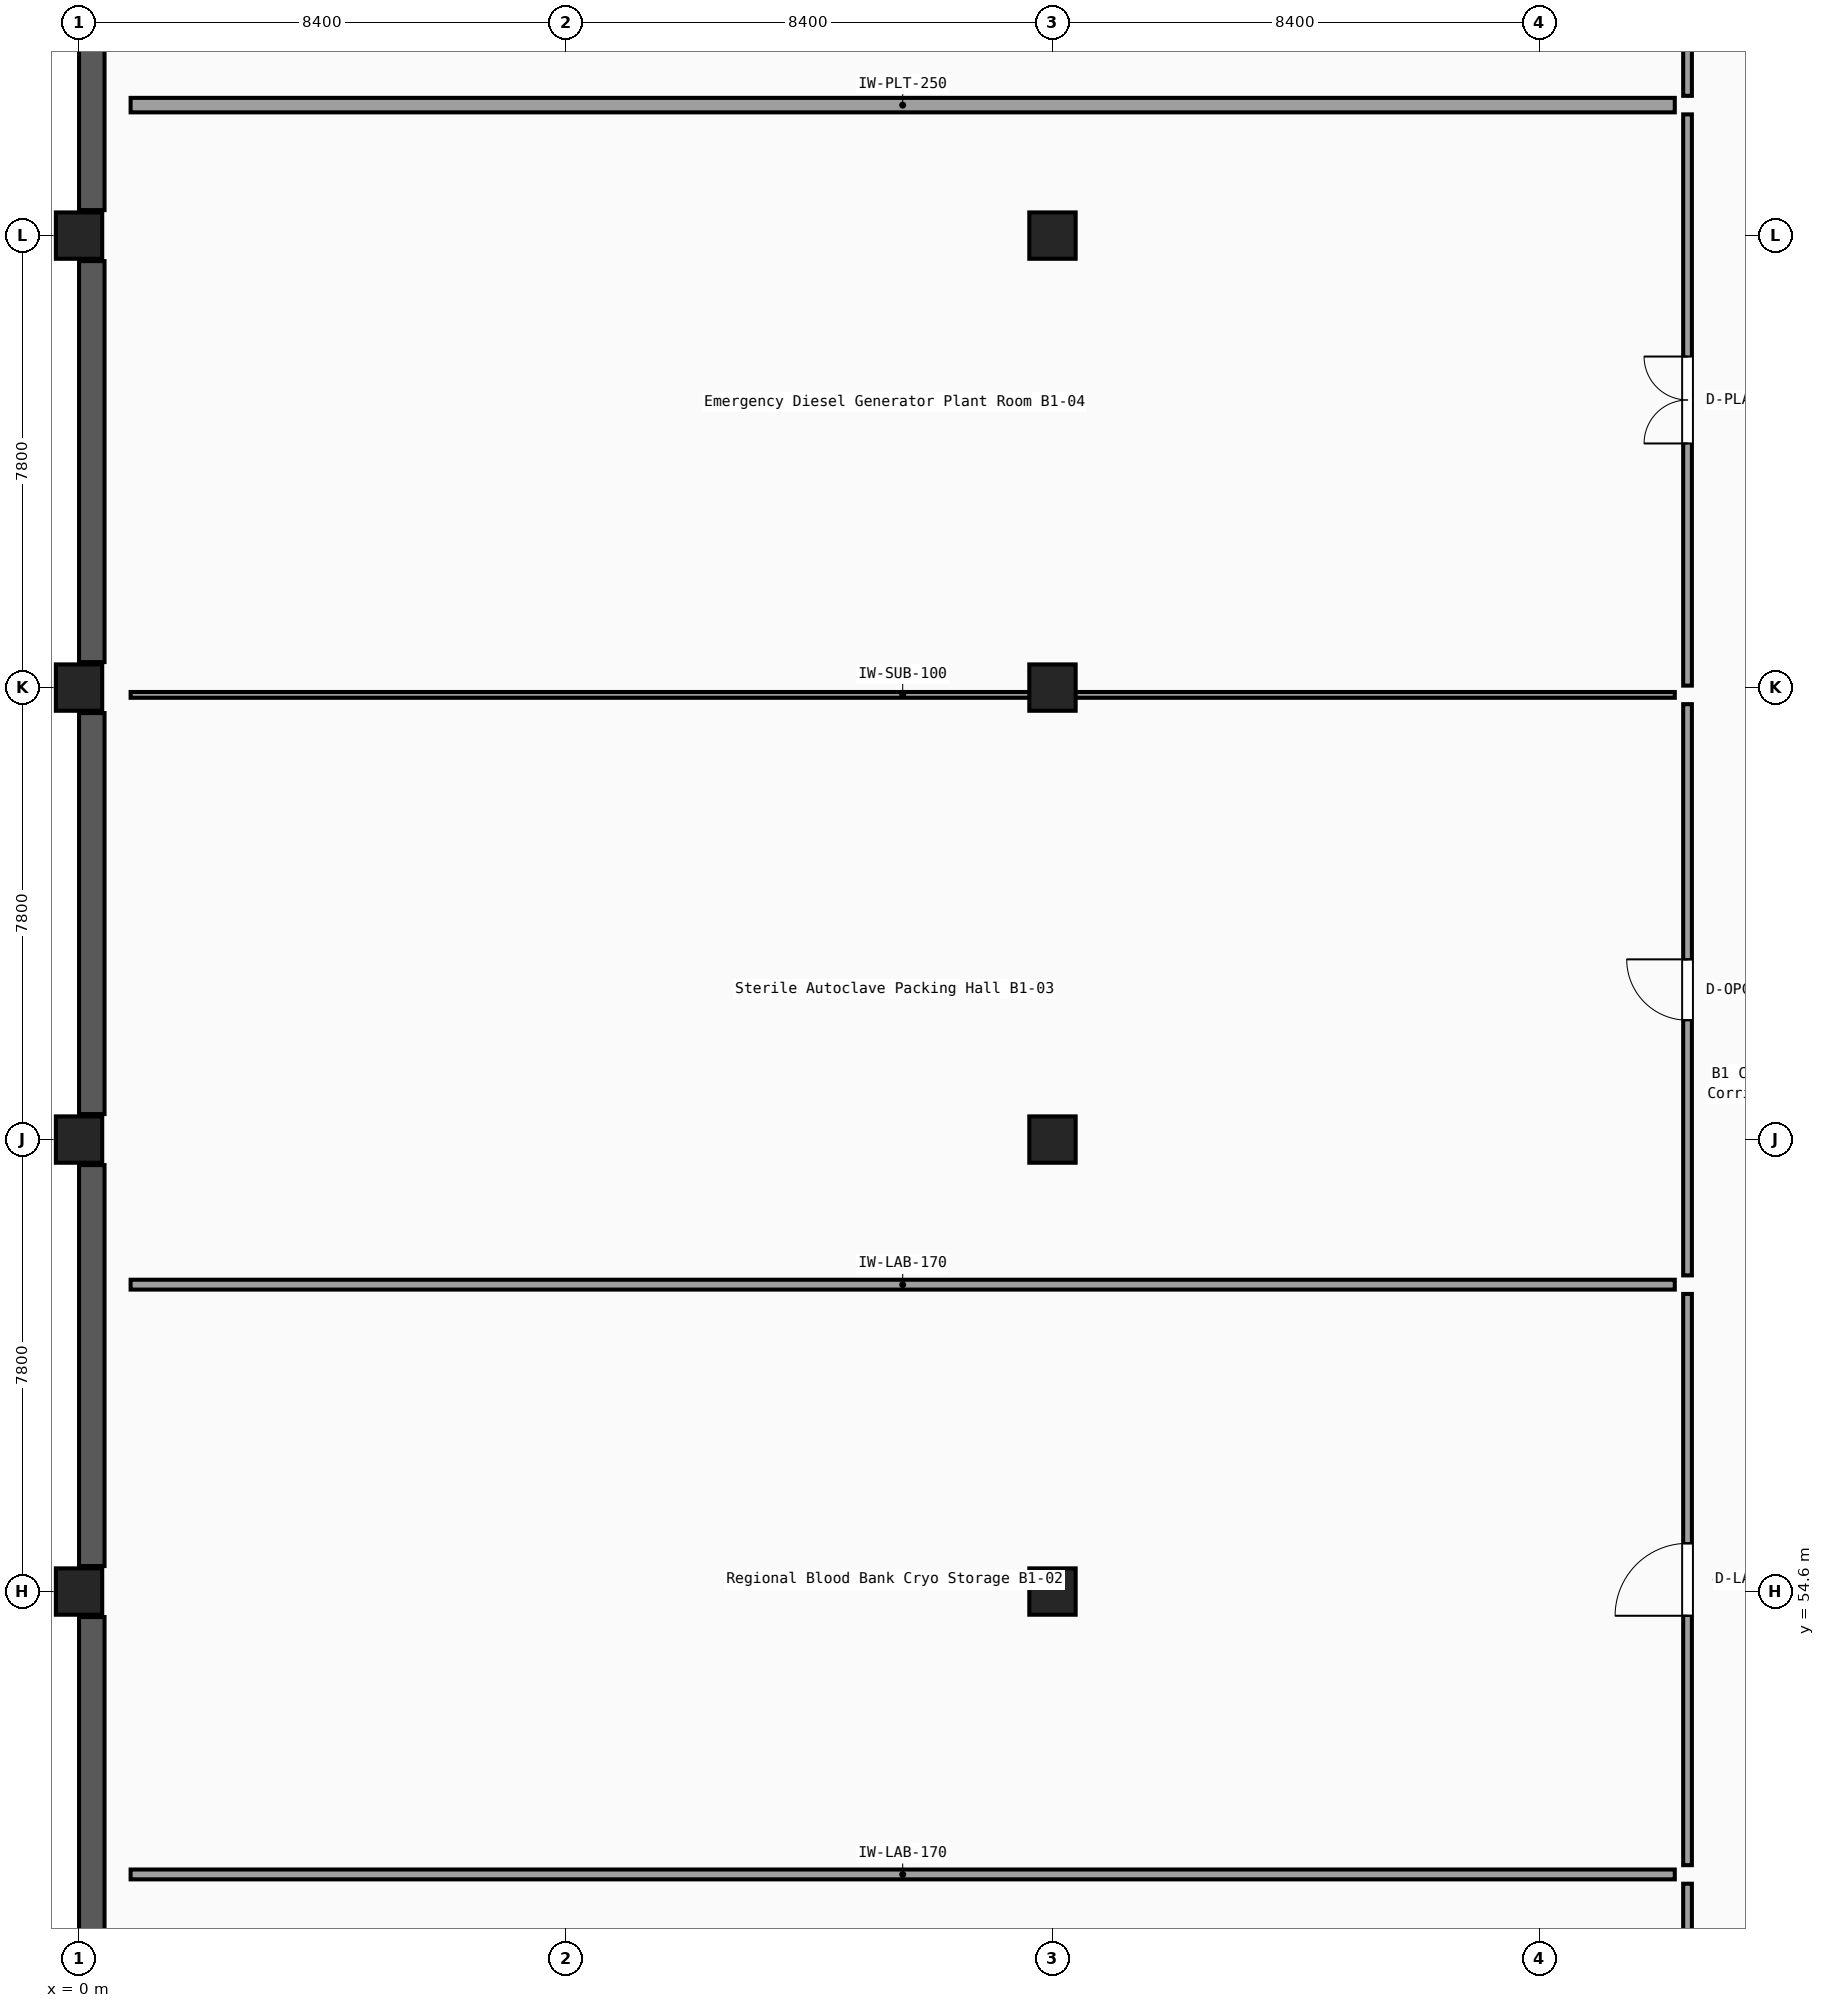
"""IFC4 building model, lengths in metres.
Left out: names, types, materials, properties, quantities, classifications, styles, units other than length and angle.
Written with IfcOpenShell. Run it as: python <this file> out.ifc"""

import sys

from ifc_helpers import new_model, si_unit, direction, frame, frame_2d, origin, origin_2d, place, context, subcontext, project, spatial, rectangle, extrude, element, fill, save


model = new_model("IFC4")
c1 = context("Model", 3, precision=1e-05, world=origin(), true_north=direction((0.0, 1.0)))
c2 = subcontext(c1, "Body", "Model", "MODEL_VIEW")
j1 = project(units=[si_unit("LENGTHUNIT", "METRE"), si_unit("PLANEANGLEUNIT", "RADIAN")], contexts=[c1])
p1 = place(None, origin())
s1 = spatial("IfcSite", under=j1, at=p1, CompositionType="ELEMENT")
p2 = place(p1, origin())
s2 = spatial("IfcBuilding", under=s1, at=p2, CompositionType="ELEMENT")
p3 = place(p2, frame((0.0, 0.0, -5.1)))
s3 = spatial("IfcBuildingStorey", under=s2, at=p3, CompositionType="ELEMENT", Elevation=-5.1)
for number, where, z_axis, x_axis in (
    (1, (0.0, 54.6, -0.22), (0.0, 0.0, 1.0), (1.0, 0.0, 0.0)),
    (2, (0.0, 62.4, -0.22), (0.0, 0.0, 1.0), (1.0, 0.0, 0.0)),
    (3, (0.0, 70.2, -0.22), (0.0, 0.0, 1.0), (1.0, 0.0, 0.0)),
    (4, (0.0, 78.0, -0.22), (0.0, 0.0, 1.0), (1.0, 0.0, 0.0)),
    (5, (16.8, 54.6, -0.22), (0.0, 0.0, 1.0), (1.0, 0.0, 0.0)),
    (6, (16.8, 62.4, -0.22), (0.0, 0.0, 1.0), (1.0, 0.0, 0.0)),
    (7, (16.8, 70.2, -0.22), (0.0, 0.0, 1.0), (1.0, 0.0, 0.0)),
    (8, (16.8, 78.0, -0.22), (0.0, 0.0, 1.0), (1.0, 0.0, 0.0)),
):
    element("IfcColumn", number, at=place(p3, frame(where, z_axis=z_axis, x_axis=x_axis)), inside=s3, PredefinedType="COLUMN", context=c2, shape_type="SweptSolid", body=[
        extrude(rectangle(XDim=0.8, YDim=0.8, at=origin_2d()), origin(), (0.0, 0.0, 1.0), 5.32),
    ])
p4 = place(p3, frame((0.22, 47.24, 0.0), z_axis=(0.0, 0.0, 1.0), x_axis=(0.0, 1.0, 0.0)))
e9 = element("IfcWall", 9, at=p4, inside=s3, PredefinedType="USERDEFINED", context=c2, shape_type="SweptSolid", body=[
    extrude(rectangle(XDim=6.92, YDim=0.44, at=frame_2d((3.46, 0.0))), origin(), (0.0, 0.0, 1.0), 4.28),
])
for number, where, z_axis, x_axis in (
    (10, (0.22, 55.04, 0.0), (0.0, 0.0, 1.0), (0.0, 1.0, 0.0)),
    (11, (0.22, 62.84, 0.0), (0.0, 0.0, 1.0), (0.0, 1.0, 0.0)),
):
    element("IfcWall", number, at=place(p3, frame(where, z_axis=z_axis, x_axis=x_axis)), inside=s3, PredefinedType="USERDEFINED", context=c2, shape_type="SweptSolid", body=[
        extrude(rectangle(XDim=6.92, YDim=0.44, at=frame_2d((3.46, 0.0))), origin(), (0.0, 0.0, 1.0), 4.23),
    ])
for number, where, z_axis, x_axis in (
    (12, (0.22, 70.64, 0.0), (0.0, 0.0, 1.0), (0.0, 1.0, 0.0)),
    (13, (0.22, 78.44, 0.0), (0.0, 0.0, 1.0), (0.0, 1.0, 0.0)),
):
    element("IfcWall", number, at=place(p3, frame(where, z_axis=z_axis, x_axis=x_axis)), inside=s3, PredefinedType="USERDEFINED", context=c2, shape_type="SweptSolid", body=[
        extrude(rectangle(XDim=6.92, YDim=0.44, at=frame_2d((3.46, 0.0))), origin(), (0.0, 0.0, 1.0), 4.28),
    ])
p5 = place(p3, frame((27.76, 39.62, 0.0), z_axis=(0.0, 0.0, 1.0), x_axis=(0.0, 1.0, 0.0)))
e14 = element("IfcWall", 14, at=p5, inside=s3, PredefinedType="PARTITIONING", context=c2, shape_type="SweptSolid", body=[
    extrude(rectangle(XDim=9.938, YDim=0.15, at=frame_2d((4.969, 0.0))), origin(), (0.0, 0.0, 1.0), 4.28),
])
p6 = place(p5, frame((4.344, 0.0, 0.0)))
e15 = element("IfcOpeningElement", 15, at=p6, cuts=e14, PredefinedType="OPENING", context=c2, shape_type="SweptSolid", body=[
    extrude(rectangle(XDim=1.25, YDim=2.2, at=frame_2d((0.625, 1.1))), frame((0.0, 0.085, 0.0), z_axis=(0.0, -1.0, 0.0), x_axis=(1.0, 0.0, 0.0)), (0.0, 0.0, 1.0), 0.17),
])
p7 = place(p3, frame((0.89, 49.718, 0.0), z_axis=(0.0, 0.0, 1.0), x_axis=(1.0, 0.0, 0.0)))
e16 = element("IfcWall", 16, at=p7, inside=s3, PredefinedType="PARTITIONING", context=c2, shape_type="SweptSolid", body=[
    extrude(rectangle(XDim=26.65, YDim=0.17, at=frame_2d((13.325, 0.0))), origin(), (0.0, 0.0, 1.0), 4.48),
])
p8 = place(p3, frame((27.76, 49.878, 0.0), z_axis=(0.0, 0.0, 1.0), x_axis=(0.0, 1.0, 0.0)))
e17 = element("IfcWall", 17, at=p8, inside=s3, PredefinedType="PARTITIONING", context=c2, shape_type="SweptSolid", body=[
    extrude(rectangle(XDim=9.858, YDim=0.15, at=frame_2d((4.929, 0.0))), origin(), (0.0, 0.0, 1.0), 4.28),
])
p9 = place(p8, frame((4.304, 0.0, 0.0)))
e18 = element("IfcOpeningElement", 18, at=p9, cuts=e17, PredefinedType="OPENING", context=c2, shape_type="SweptSolid", body=[
    extrude(rectangle(XDim=1.25, YDim=2.2, at=frame_2d((0.625, 1.1))), frame((0.0, 0.085, 0.0), z_axis=(0.0, -1.0, 0.0), x_axis=(1.0, 0.0, 0.0)), (0.0, 0.0, 1.0), 0.17),
])
p10 = place(p3, frame((0.89, 59.896, 0.0), z_axis=(0.0, 0.0, 1.0), x_axis=(1.0, 0.0, 0.0)))
e19 = element("IfcWall", 19, at=p10, inside=s3, PredefinedType="PARTITIONING", context=c2, shape_type="SweptSolid", body=[
    extrude(rectangle(XDim=26.65, YDim=0.17, at=frame_2d((13.325, 0.0))), origin(), (0.0, 0.0, 1.0), 4.48),
])
p11 = place(p3, frame((27.76, 60.056, 0.0), z_axis=(0.0, 0.0, 1.0), x_axis=(0.0, 1.0, 0.0)))
e20 = element("IfcWall", 20, at=p11, inside=s3, PredefinedType="PARTITIONING", context=c2, shape_type="SweptSolid", body=[
    extrude(rectangle(XDim=9.858, YDim=0.15, at=frame_2d((4.929, 0.0))), origin(), (0.0, 0.0, 1.0), 4.28),
])
p12 = place(p11, frame((4.404, 0.0, 0.0)))
e21 = element("IfcOpeningElement", 21, at=p12, cuts=e20, PredefinedType="OPENING", context=c2, shape_type="SweptSolid", body=[
    extrude(rectangle(XDim=1.05, YDim=2.15, at=frame_2d((0.525, 1.075))), frame((0.0, 0.085, 0.0), z_axis=(0.0, -1.0, 0.0), x_axis=(1.0, 0.0, 0.0)), (0.0, 0.0, 1.0), 0.17),
])
p13 = place(p3, frame((0.89, 70.074, 0.0), z_axis=(0.0, 0.0, 1.0), x_axis=(1.0, 0.0, 0.0)))
e22 = element("IfcWall", 22, at=p13, inside=s3, PredefinedType="PARTITIONING", context=c2, shape_type="SweptSolid", body=[
    extrude(rectangle(XDim=26.65, YDim=0.1, at=frame_2d((13.325, 0.0))), origin(), (0.0, 0.0, 1.0), 4.28),
])
p14 = place(p3, frame((27.76, 70.234, 0.0), z_axis=(0.0, 0.0, 1.0), x_axis=(0.0, 1.0, 0.0)))
e23 = element("IfcWall", 23, at=p14, inside=s3, PredefinedType="PARTITIONING", context=c2, shape_type="SweptSolid", body=[
    extrude(rectangle(XDim=9.858, YDim=0.15, at=frame_2d((4.929, 0.0))), origin(), (0.0, 0.0, 1.0), 4.28),
])
p15 = place(p14, frame((4.179, 0.0, 0.0)))
e24 = element("IfcOpeningElement", 24, at=p15, cuts=e23, PredefinedType="OPENING", context=c2, shape_type="SweptSolid", body=[
    extrude(rectangle(XDim=1.5, YDim=2.25, at=frame_2d((0.75, 1.125))), frame((0.0, 0.085, 0.0), z_axis=(0.0, -1.0, 0.0), x_axis=(1.0, 0.0, 0.0)), (0.0, 0.0, 1.0), 0.17),
])
p16 = place(p3, frame((0.89, 80.252, 0.0), z_axis=(0.0, 0.0, 1.0), x_axis=(1.0, 0.0, 0.0)))
e25 = element("IfcWall", 25, at=p16, inside=s3, PredefinedType="PARTITIONING", context=c2, shape_type="SweptSolid", body=[
    extrude(rectangle(XDim=26.65, YDim=0.25, at=frame_2d((13.325, 0.0))), origin(), (0.0, 0.0, 1.0), 4.48),
])
p17 = place(p3, frame((27.76, 80.412, 0.0), z_axis=(0.0, 0.0, 1.0), x_axis=(0.0, 1.0, 0.0)))
e26 = element("IfcWall", 26, at=p17, inside=s3, PredefinedType="PARTITIONING", context=c2, shape_type="SweptSolid", body=[
    extrude(rectangle(XDim=9.938, YDim=0.15, at=frame_2d((4.969, 0.0))), origin(), (0.0, 0.0, 1.0), 4.47),
])
p18 = place(p17, frame((4.219, 0.0, 0.0)))
e27 = element("IfcOpeningElement", 27, at=p18, cuts=e26, PredefinedType="OPENING", context=c2, shape_type="SweptSolid", body=[
    extrude(rectangle(XDim=1.5, YDim=2.25, at=frame_2d((0.75, 1.125))), frame((0.0, 0.085, 0.0), z_axis=(0.0, -1.0, 0.0), x_axis=(1.0, 0.0, 0.0)), (0.0, 0.0, 1.0), 0.17),
])
p19 = place(p9, origin())
e28 = element("IfcDoor", 28, at=p19, inside=s3, OperationType="SINGLE_SWING_LEFT", PredefinedType="DOOR", context=c2, shape_type="SweptSolid", body=[
    extrude(rectangle(XDim=1.25, YDim=2.2, at=frame_2d((0.625, 1.1))), frame((0.0, 0.025, 0.0), z_axis=(0.0, -1.0, 0.0), x_axis=(1.0, 0.0, 0.0)), (0.0, 0.0, 1.0), 0.05),
])
fill(e18, e28)
p20 = place(p12, origin())
e29 = element("IfcDoor", 29, at=p20, inside=s3, OperationType="SINGLE_SWING_RIGHT", PredefinedType="DOOR", context=c2, shape_type="SweptSolid", body=[
    extrude(rectangle(XDim=1.05, YDim=2.15, at=frame_2d((0.525, 1.075))), frame((0.0, 0.025, 0.0), z_axis=(0.0, -1.0, 0.0), x_axis=(1.0, 0.0, 0.0)), (0.0, 0.0, 1.0), 0.05),
])
fill(e21, e29)
p21 = place(p15, origin())
e30 = element("IfcDoor", 30, at=p21, inside=s3, OperationType="DOUBLE_DOOR_SINGLE_SWING", PredefinedType="DOOR", context=c2, shape_type="SweptSolid", body=[
    extrude(rectangle(XDim=1.5, YDim=2.25, at=frame_2d((0.75, 1.125))), frame((0.0, 0.025, 0.0), z_axis=(0.0, -1.0, 0.0), x_axis=(1.0, 0.0, 0.0)), (0.0, 0.0, 1.0), 0.05),
])
fill(e24, e30)
save(model, sys.argv[1])
